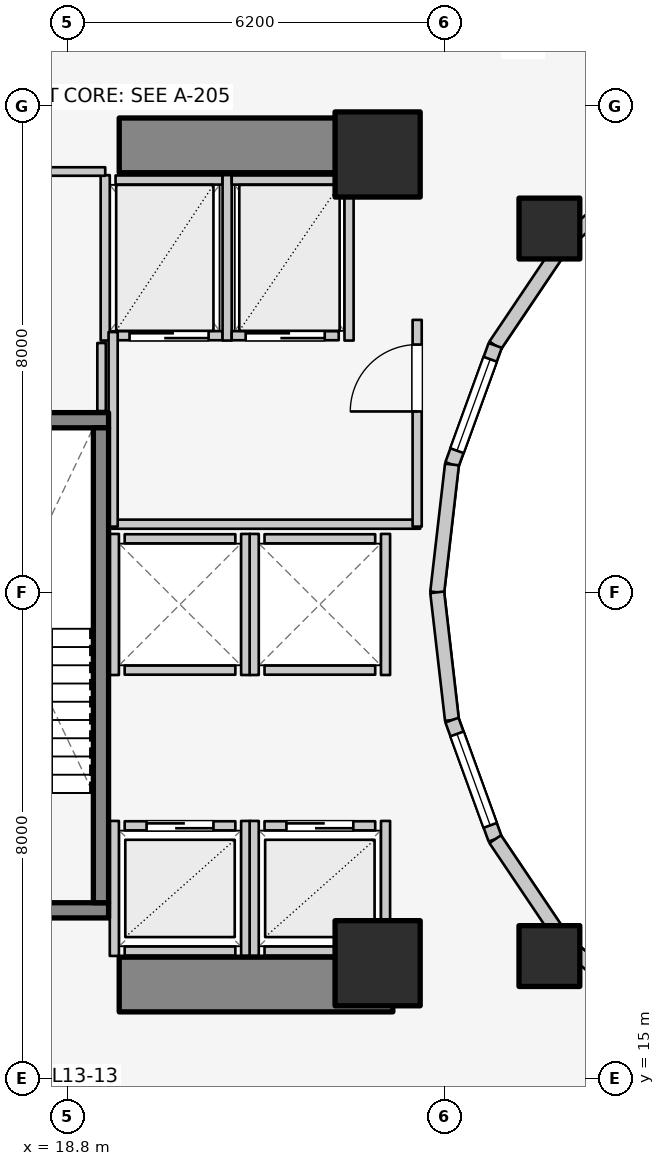
"""IFC4 building model, lengths in metres.
Left out: names, types, materials, properties, quantities, classifications, styles, units other than length and angle.
Written with IfcOpenShell. Run it as: python <this file> out.ifc"""

import sys

from ifc_helpers import new_model, si_unit, direction, frame, frame_2d, origin, origin_2d, place, context, subcontext, project, spatial, rectangle, extrude, element, fill, save


model = new_model("IFC4")
c1 = context("Model", 3, precision=1e-05, world=origin(), true_north=direction((0.0, 1.0)))
c2 = subcontext(c1, "Body", "Model", "MODEL_VIEW")
j1 = project(units=[si_unit("LENGTHUNIT", "METRE"), si_unit("PLANEANGLEUNIT", "RADIAN")], contexts=[c1])
p1 = place(None, origin())
s1 = spatial("IfcSite", under=j1, at=p1, CompositionType="ELEMENT")
p2 = place(p1, origin())
s2 = spatial("IfcBuilding", under=s1, at=p2, CompositionType="ELEMENT")
p3 = place(p2, frame((0.0, 0.0, 46.2)))
s3 = spatial("IfcBuildingStorey", under=s2, at=p3, CompositionType="ELEMENT", Elevation=46.2)
for number, where, z_axis, x_axis in (
    (1, (19.65, 16.55, 0.0), (0.0, 0.0, 1.0), (1.0, 0.0, 0.0)),
    (2, (19.65, 30.35, 0.0), (0.0, 0.0, 1.0), (1.0, 0.0, 0.0)),
):
    element("IfcWall", number, at=place(p3, frame(where, z_axis=z_axis, x_axis=x_axis)), inside=s3, PredefinedType="SHEAR", context=c2, shape_type="SweptSolid", body=[
        extrude(rectangle(XDim=4.5, YDim=0.9, at=frame_2d((2.25, 0.0))), origin(), (0.0, 0.0, 1.0), 3.1),
    ])
p4 = place(p3, frame((16.105, 17.77, 0.0), z_axis=(0.0, 0.0, 1.0), x_axis=(1.0, 0.0, 0.0)))
e3 = element("IfcWall", 3, at=p4, inside=s3, PredefinedType="SOLIDWALL", context=c2, shape_type="SweptSolid", body=[
    extrude(rectangle(XDim=3.37, YDim=0.25, at=frame_2d((1.685, 0.0))), origin(), (0.0, 0.0, 1.0), 3.1),
])
p5 = place(p4, frame((1.135, 0.0, 0.0)))
e4 = element("IfcOpeningElement", 4, at=p5, cuts=e3, PredefinedType="OPENING", context=c2, shape_type="SweptSolid", body=[
    extrude(rectangle(XDim=1.1, YDim=2.1, at=frame_2d((0.55, 1.05))), frame((0.0, 0.135, 0.0), z_axis=(0.0, -1.0, 0.0), x_axis=(1.0, 0.0, 0.0)), (0.0, 0.0, 1.0), 0.27),
])
p6 = place(p3, frame((16.105, 25.83, 0.0), z_axis=(0.0, 0.0, 1.0), x_axis=(1.0, 0.0, 0.0)))
e5 = element("IfcWall", 5, at=p6, inside=s3, PredefinedType="SOLIDWALL", context=c2, shape_type="SweptSolid", body=[
    extrude(rectangle(XDim=3.37, YDim=0.25, at=frame_2d((1.685, 0.0))), origin(), (0.0, 0.0, 1.0), 3.1),
])
p7 = place(p3, frame((19.35, 17.895, 0.0), z_axis=(0.0, 0.0, 1.0), x_axis=(0.0, 1.0, 0.0)))
e6 = element("IfcWall", 6, at=p7, inside=s3, PredefinedType="SOLIDWALL", context=c2, shape_type="SweptSolid", body=[
    extrude(rectangle(XDim=7.81, YDim=0.25, at=frame_2d((3.905, 0.0))), origin(), (0.0, 0.0, 1.0), 3.1),
])
for number, where, z_axis, x_axis in (
    (7, (23.9, 16.9, 0.0), (0.0, 0.0, 1.0), (1.0, 0.0, 0.0)),
    (8, (23.9, 30.2, 0.0), (0.0, 0.0, 1.0), (1.0, 0.0, 0.0)),
):
    element("IfcColumn", number, at=place(p3, frame(where, z_axis=z_axis, x_axis=x_axis)), inside=s3, PredefinedType="COLUMN", context=c2, shape_type="SweptSolid", body=[
        extrude(rectangle(XDim=1.4, YDim=1.4, at=origin_2d()), origin(), (0.0, 0.0, 1.0), 3.1),
    ])
for number, where, z_axis, x_axis in (
    (9, (26.725, 28.982, 0.0), (0.0, 0.0, 1.0), (1.0, 0.0, 0.0)),
    (10, (26.725, 17.018, 0.0), (0.0, 0.0, 1.0), (1.0, 0.0, 0.0)),
):
    element("IfcColumn", number, at=place(p3, frame(where, z_axis=z_axis, x_axis=x_axis)), inside=s3, PredefinedType="COLUMN", context=c2, shape_type="SweptSolid", body=[
        extrude(rectangle(XDim=1.0, YDim=1.0, at=origin_2d()), origin(), (0.0, 0.0, 1.0), 3.1),
    ])
p8 = place(p3, frame((28.44, 30.032, 0.0), z_axis=(0.0, 0.0, 1.0), x_axis=(-0.752576694707, -0.658504607869, 0.0)))
e11 = element("IfcWall", 11, at=p8, inside=s3, PredefinedType="STANDARD", context=c2, shape_type="SweptSolid", body=[
    extrude(rectangle(XDim=1.959, YDim=0.23, at=frame_2d((0.98, 0.0))), origin(), (0.0, 0.0, 1.0), 2.16),
])
p9 = place(p3, frame((26.965, 28.742, 0.0), z_axis=(0.0, 0.0, 1.0), x_axis=(-0.558197800898, -0.829707909492, 0.0)))
e12 = element("IfcWall", 12, at=p9, inside=s3, PredefinedType="STANDARD", context=c2, shape_type="SweptSolid", body=[
    extrude(rectangle(XDim=2.027, YDim=0.23, at=frame_2d((1.013, 0.0))), origin(), (0.0, 0.0, 1.0), 2.16),
])
p10 = place(p3, frame((25.834, 27.06, 0.0), z_axis=(0.0, 0.0, 1.0), x_axis=(-0.341423187295, -0.93990968033, 0.0)))
e13 = element("IfcWall", 13, at=p10, inside=s3, PredefinedType="STANDARD", context=c2, shape_type="SweptSolid", body=[
    extrude(rectangle(XDim=2.084, YDim=0.23, at=frame_2d((1.042, 0.0))), origin(), (0.0, 0.0, 1.0), 2.84),
])
p11 = place(p10, frame((0.242, 0.0, 0.85)))
e14 = element("IfcOpeningElement", 14, at=p11, cuts=e13, PredefinedType="OPENING", context=c2, shape_type="SweptSolid", body=[
    extrude(rectangle(XDim=1.6, YDim=1.65, at=frame_2d((0.8, 0.825))), frame((0.0, 0.125, 0.0), z_axis=(0.0, -1.0, 0.0), x_axis=(1.0, 0.0, 0.0)), (0.0, 0.0, 1.0), 0.25),
])
for number, where, z_axis, x_axis in (
    (15, (25.123, 25.102, 0.0), (0.0, 0.0, 1.0), (-0.115, -0.993, 0.0)),
    (16, (24.88, 23.0, 0.0), (0.0, 0.0, 1.0), (0.115, -0.993, 0.0)),
):
    element("IfcWall", number, at=place(p3, frame(where, z_axis=z_axis, x_axis=x_axis)), inside=s3, PredefinedType="STANDARD", context=c2, shape_type="SweptSolid", body=[
        extrude(rectangle(XDim=2.115, YDim=0.23, at=frame_2d((1.058, 0.0))), origin(), (0.0, 0.0, 1.0), 2.84),
    ])
p12 = place(p3, frame((25.123, 20.898, 0.0), z_axis=(0.0, 0.0, 1.0), x_axis=(0.341423187295, -0.93990968033, 0.0)))
e17 = element("IfcWall", 17, at=p12, inside=s3, PredefinedType="STANDARD", context=c2, shape_type="SweptSolid", body=[
    extrude(rectangle(XDim=2.084, YDim=0.23, at=frame_2d((1.042, 0.0))), origin(), (0.0, 0.0, 1.0), 2.84),
])
p13 = place(p12, frame((0.242, 0.0, 0.85)))
e18 = element("IfcOpeningElement", 18, at=p13, cuts=e17, PredefinedType="OPENING", context=c2, shape_type="SweptSolid", body=[
    extrude(rectangle(XDim=1.6, YDim=1.65, at=frame_2d((0.8, 0.825))), frame((0.0, 0.125, 0.0), z_axis=(0.0, -1.0, 0.0), x_axis=(1.0, 0.0, 0.0)), (0.0, 0.0, 1.0), 0.25),
])
p14 = place(p3, frame((25.834, 18.94, 0.0), z_axis=(0.0, 0.0, 1.0), x_axis=(0.558197800898, -0.829707909492, 0.0)))
e19 = element("IfcWall", 19, at=p14, inside=s3, PredefinedType="STANDARD", context=c2, shape_type="SweptSolid", body=[
    extrude(rectangle(XDim=2.027, YDim=0.23, at=frame_2d((1.013, 0.0))), origin(), (0.0, 0.0, 1.0), 2.16),
])
p15 = place(p3, frame((26.965, 17.258, 0.0), z_axis=(0.0, 0.0, 1.0), x_axis=(0.752576694707, -0.658504607869, 0.0)))
e20 = element("IfcWall", 20, at=p15, inside=s3, PredefinedType="STANDARD", context=c2, shape_type="SweptSolid", body=[
    extrude(rectangle(XDim=1.959, YDim=0.23, at=frame_2d((0.98, 0.0))), origin(), (0.0, 0.0, 1.0), 2.16),
])
p16 = place(p3, frame((19.74, 19.16, 0.0), z_axis=(0.0, 0.0, 1.0), x_axis=(1.0, 0.0, 0.0)))
e21 = element("IfcWall", 21, at=p16, inside=s3, PredefinedType="SOLIDWALL", context=c2, shape_type="SweptSolid", body=[
    extrude(rectangle(XDim=1.82, YDim=0.15, at=frame_2d((0.91, 0.0))), origin(), (0.0, 0.0, 1.0), 2.855),
])
p17 = place(p16, frame((0.36, 0.0, 0.0)))
e22 = element("IfcOpeningElement", 22, at=p17, cuts=e21, PredefinedType="OPENING", context=c2, shape_type="SweptSolid", body=[
    extrude(rectangle(XDim=1.1, YDim=2.1, at=frame_2d((0.55, 1.05))), frame((0.0, 0.085, 0.0), z_axis=(0.0, -1.0, 0.0), x_axis=(1.0, 0.0, 0.0)), (0.0, 0.0, 1.0), 0.17),
])
p18 = place(p3, frame((19.74, 17.1, 0.0), z_axis=(0.0, 0.0, 1.0), x_axis=(1.0, 0.0, 0.0)))
e23 = element("IfcWall", 23, at=p18, inside=s3, PredefinedType="SOLIDWALL", context=c2, shape_type="SweptSolid", body=[
    extrude(rectangle(XDim=1.82, YDim=0.15, at=frame_2d((0.91, 0.0))), origin(), (0.0, 0.0, 1.0), 2.855),
])
p19 = place(p3, frame((19.57, 17.02, 0.0), z_axis=(0.0, 0.0, 1.0), x_axis=(0.0, 1.0, 0.0)))
e24 = element("IfcWall", 24, at=p19, inside=s3, PredefinedType="SOLIDWALL", context=c2, shape_type="SweptSolid", body=[
    extrude(rectangle(XDim=2.22, YDim=0.15, at=frame_2d((1.11, 0.0))), origin(), (0.0, 0.0, 1.0), 2.12),
])
p20 = place(p3, frame((21.73, 17.02, 0.0), z_axis=(0.0, 0.0, 1.0), x_axis=(0.0, 1.0, 0.0)))
e25 = element("IfcWall", 25, at=p20, inside=s3, PredefinedType="SOLIDWALL", context=c2, shape_type="SweptSolid", body=[
    extrude(rectangle(XDim=2.22, YDim=0.15, at=frame_2d((1.11, 0.0))), origin(), (0.0, 0.0, 1.0), 2.855),
])
p21 = place(p3, frame((22.04, 19.16, 0.0), z_axis=(0.0, 0.0, 1.0), x_axis=(1.0, 0.0, 0.0)))
e26 = element("IfcWall", 26, at=p21, inside=s3, PredefinedType="SOLIDWALL", context=c2, shape_type="SweptSolid", body=[
    extrude(rectangle(XDim=1.82, YDim=0.15, at=frame_2d((0.91, 0.0))), origin(), (0.0, 0.0, 1.0), 2.12),
])
p22 = place(p21, frame((0.36, 0.0, 0.0)))
e27 = element("IfcOpeningElement", 27, at=p22, cuts=e26, PredefinedType="OPENING", context=c2, shape_type="SweptSolid", body=[
    extrude(rectangle(XDim=1.1, YDim=2.1, at=frame_2d((0.55, 1.05))), frame((0.0, 0.085, 0.0), z_axis=(0.0, -1.0, 0.0), x_axis=(1.0, 0.0, 0.0)), (0.0, 0.0, 1.0), 0.17),
])
p23 = place(p3, frame((22.04, 17.1, 0.0), z_axis=(0.0, 0.0, 1.0), x_axis=(1.0, 0.0, 0.0)))
e28 = element("IfcWall", 28, at=p23, inside=s3, PredefinedType="SOLIDWALL", context=c2, shape_type="SweptSolid", body=[
    extrude(rectangle(XDim=1.82, YDim=0.15, at=frame_2d((0.91, 0.0))), origin(), (0.0, 0.0, 1.0), 2.12),
])
p24 = place(p3, frame((21.87, 17.02, 0.0), z_axis=(0.0, 0.0, 1.0), x_axis=(0.0, 1.0, 0.0)))
e29 = element("IfcWall", 29, at=p24, inside=s3, PredefinedType="SOLIDWALL", context=c2, shape_type="SweptSolid", body=[
    extrude(rectangle(XDim=2.22, YDim=0.15, at=frame_2d((1.11, 0.0))), origin(), (0.0, 0.0, 1.0), 2.855),
])
p25 = place(p3, frame((24.03, 17.02, 0.0), z_axis=(0.0, 0.0, 1.0), x_axis=(0.0, 1.0, 0.0)))
e30 = element("IfcWall", 30, at=p25, inside=s3, PredefinedType="SOLIDWALL", context=c2, shape_type="SweptSolid", body=[
    extrude(rectangle(XDim=2.22, YDim=0.15, at=frame_2d((1.11, 0.0))), origin(), (0.0, 0.0, 1.0), 2.12),
])
for number, where, z_axis, x_axis in (
    (31, (19.74, 21.72, 0.0), (0.0, 0.0, 1.0), (1.0, 0.0, 0.0)),
    (32, (19.74, 23.88, 0.0), (0.0, 0.0, 1.0), (1.0, 0.0, 0.0)),
):
    element("IfcWall", number, at=place(p3, frame(where, z_axis=z_axis, x_axis=x_axis)), inside=s3, PredefinedType="SOLIDWALL", context=c2, shape_type="SweptSolid", body=[
        extrude(rectangle(XDim=1.82, YDim=0.15, at=frame_2d((0.91, 0.0))), origin(), (0.0, 0.0, 1.0), 2.855),
    ])
for number, where, z_axis, x_axis in (
    (33, (19.57, 21.64, 0.0), (0.0, 0.0, 1.0), (0.0, 1.0, 0.0)),
    (34, (21.73, 21.64, 0.0), (0.0, 0.0, 1.0), (0.0, 1.0, 0.0)),
):
    element("IfcWall", number, at=place(p3, frame(where, z_axis=z_axis, x_axis=x_axis)), inside=s3, PredefinedType="SOLIDWALL", context=c2, shape_type="SweptSolid", body=[
        extrude(rectangle(XDim=2.32, YDim=0.15, at=frame_2d((1.16, 0.0))), origin(), (0.0, 0.0, 1.0), 2.855),
    ])
for number, where, z_axis, x_axis in (
    (35, (22.04, 21.72, 0.0), (0.0, 0.0, 1.0), (1.0, 0.0, 0.0)),
    (36, (22.04, 23.88, 0.0), (0.0, 0.0, 1.0), (1.0, 0.0, 0.0)),
):
    element("IfcWall", number, at=place(p3, frame(where, z_axis=z_axis, x_axis=x_axis)), inside=s3, PredefinedType="SOLIDWALL", context=c2, shape_type="SweptSolid", body=[
        extrude(rectangle(XDim=1.82, YDim=0.15, at=frame_2d((0.91, 0.0))), origin(), (0.0, 0.0, 1.0), 2.12),
    ])
p26 = place(p3, frame((21.87, 21.64, 0.0), z_axis=(0.0, 0.0, 1.0), x_axis=(0.0, 1.0, 0.0)))
e37 = element("IfcWall", 37, at=p26, inside=s3, PredefinedType="SOLIDWALL", context=c2, shape_type="SweptSolid", body=[
    extrude(rectangle(XDim=2.32, YDim=0.15, at=frame_2d((1.16, 0.0))), origin(), (0.0, 0.0, 1.0), 2.855),
])
p27 = place(p3, frame((24.03, 21.64, 0.0), z_axis=(0.0, 0.0, 1.0), x_axis=(0.0, 1.0, 0.0)))
e38 = element("IfcWall", 38, at=p27, inside=s3, PredefinedType="SOLIDWALL", context=c2, shape_type="SweptSolid", body=[
    extrude(rectangle(XDim=2.32, YDim=0.15, at=frame_2d((1.16, 0.0))), origin(), (0.0, 0.0, 1.0), 2.12),
])
p28 = place(p3, frame((19.59, 27.22, 0.0), z_axis=(0.0, 0.0, 1.0), x_axis=(1.0, 0.0, 0.0)))
e39 = element("IfcWall", 39, at=p28, inside=s3, PredefinedType="SOLIDWALL", context=c2, shape_type="SweptSolid", body=[
    extrude(rectangle(XDim=1.76, YDim=0.15, at=frame_2d((0.88, 0.0))), origin(), (0.0, 0.0, 1.0), 2.855),
])
p29 = place(p28, frame((0.23, 0.0, 0.0)))
e40 = element("IfcOpeningElement", 40, at=p29, cuts=e39, PredefinedType="OPENING", context=c2, shape_type="SweptSolid", body=[
    extrude(rectangle(XDim=1.3, YDim=2.1, at=frame_2d((0.65, 1.05))), frame((0.0, 0.085, 0.0), z_axis=(0.0, -1.0, 0.0), x_axis=(1.0, 0.0, 0.0)), (0.0, 0.0, 1.0), 0.17),
])
p30 = place(p3, frame((19.59, 29.78, 0.0), z_axis=(0.0, 0.0, 1.0), x_axis=(1.0, 0.0, 0.0)))
e41 = element("IfcWall", 41, at=p30, inside=s3, PredefinedType="SOLIDWALL", context=c2, shape_type="SweptSolid", body=[
    extrude(rectangle(XDim=1.76, YDim=0.15, at=frame_2d((0.88, 0.0))), origin(), (0.0, 0.0, 1.0), 2.855),
])
for number, where, z_axis, x_axis in (
    (42, (19.42, 27.14, 0.0), (0.0, 0.0, 1.0), (0.0, 1.0, 0.0)),
    (43, (21.425, 27.14, 0.0), (0.0, 0.0, 1.0), (0.0, 1.0, 0.0)),
):
    element("IfcWall", number, at=place(p3, frame(where, z_axis=z_axis, x_axis=x_axis)), inside=s3, PredefinedType="SOLIDWALL", context=c2, shape_type="SweptSolid", body=[
        extrude(rectangle(XDim=2.72, YDim=0.15, at=frame_2d((1.36, 0.0))), origin(), (0.0, 0.0, 1.0), 2.855),
    ])
p31 = place(p3, frame((21.5, 27.22, 0.0), z_axis=(0.0, 0.0, 1.0), x_axis=(1.0, 0.0, 0.0)))
e44 = element("IfcWall", 44, at=p31, inside=s3, PredefinedType="SOLIDWALL", context=c2, shape_type="SweptSolid", body=[
    extrude(rectangle(XDim=1.76, YDim=0.15, at=frame_2d((0.88, 0.0))), origin(), (0.0, 0.0, 1.0), 2.855),
])
p32 = place(p31, frame((0.23, 0.0, 0.0)))
e45 = element("IfcOpeningElement", 45, at=p32, cuts=e44, PredefinedType="OPENING", context=c2, shape_type="SweptSolid", body=[
    extrude(rectangle(XDim=1.3, YDim=2.1, at=frame_2d((0.65, 1.05))), frame((0.0, 0.085, 0.0), z_axis=(0.0, -1.0, 0.0), x_axis=(1.0, 0.0, 0.0)), (0.0, 0.0, 1.0), 0.17),
])
p33 = place(p3, frame((21.5, 29.78, 0.0), z_axis=(0.0, 0.0, 1.0), x_axis=(1.0, 0.0, 0.0)))
e46 = element("IfcWall", 46, at=p33, inside=s3, PredefinedType="SOLIDWALL", context=c2, shape_type="SweptSolid", body=[
    extrude(rectangle(XDim=1.76, YDim=0.15, at=frame_2d((0.88, 0.0))), origin(), (0.0, 0.0, 1.0), 2.855),
])
p34 = place(p3, frame((23.43, 27.14, 0.0), z_axis=(0.0, 0.0, 1.0), x_axis=(0.0, 1.0, 0.0)))
e47 = element("IfcWall", 47, at=p34, inside=s3, PredefinedType="SOLIDWALL", context=c2, shape_type="SweptSolid", body=[
    extrude(rectangle(XDim=2.72, YDim=0.15, at=frame_2d((1.36, 0.0))), origin(), (0.0, 0.0, 1.0), 2.855),
])
p35 = place(p3, frame((19.52, 24.12, 0.0), z_axis=(0.0, 0.0, 1.0), x_axis=(1.0, 0.0, 0.0)))
e48 = element("IfcWall", 48, at=p35, inside=s3, PredefinedType="PARTITIONING", context=c2, shape_type="SweptSolid", body=[
    extrude(rectangle(XDim=5.08, YDim=0.15, at=frame_2d((2.54, 0.0))), origin(), (0.0, 0.0, 1.0), 2.12),
])
p36 = place(p3, frame((19.55, 24.08, 0.0), z_axis=(0.0, 0.0, 1.0), x_axis=(0.0, 1.0, 0.0)))
e49 = element("IfcWall", 49, at=p36, inside=s3, PredefinedType="PARTITIONING", context=c2, shape_type="SweptSolid", body=[
    extrude(rectangle(XDim=3.2, YDim=0.15, at=frame_2d((1.6, 0.0))), origin(), (0.0, 0.0, 1.0), 2.855),
])
p37 = place(p3, frame((24.55, 24.08, 0.0), z_axis=(0.0, 0.0, 1.0), x_axis=(0.0, 1.0, 0.0)))
e50 = element("IfcWall", 50, at=p37, inside=s3, PredefinedType="PARTITIONING", context=c2, shape_type="SweptSolid", body=[
    extrude(rectangle(XDim=3.4, YDim=0.15, at=frame_2d((1.7, 0.0))), origin(), (0.0, 0.0, 1.0), 2.855),
])
p38 = place(p37, frame((1.894, 0.0, 0.0)))
e51 = element("IfcOpeningElement", 51, at=p38, cuts=e50, PredefinedType="OPENING", context=c2, shape_type="SweptSolid", body=[
    extrude(rectangle(XDim=1.1, YDim=2.1, at=frame_2d((0.55, 1.05))), frame((0.0, 0.085, 0.0), z_axis=(0.0, -1.0, 0.0), x_axis=(1.0, 0.0, 0.0)), (0.0, 0.0, 1.0), 0.17),
])
p39 = place(p3, frame((16.12, 29.92, 0.0), z_axis=(0.0, 0.0, 1.0), x_axis=(1.0, 0.0, 0.0)))
e52 = element("IfcWall", 52, at=p39, inside=s3, PredefinedType="PLUMBINGWALL", context=c2, shape_type="SweptSolid", body=[
    extrude(rectangle(XDim=3.3, YDim=0.14, at=frame_2d((1.65, 0.0))), origin(), (0.0, 0.0, 1.0), 2.855),
])
p40 = place(p39, frame((1.516, 0.0, 0.0)))
e53 = element("IfcOpeningElement", 53, at=p40, cuts=e52, PredefinedType="OPENING", context=c2, shape_type="SweptSolid", body=[
    extrude(rectangle(XDim=0.85, YDim=2.05, at=frame_2d((0.425, 1.025))), frame((0.0, 0.08, 0.0), z_axis=(0.0, -1.0, 0.0), x_axis=(1.0, 0.0, 0.0)), (0.0, 0.0, 1.0), 0.16),
])
p41 = place(p3, frame((19.36, 25.98, 0.0), z_axis=(0.0, 0.0, 1.0), x_axis=(0.0, 1.0, 0.0)))
e54 = element("IfcWall", 54, at=p41, inside=s3, PredefinedType="PLUMBINGWALL", context=c2, shape_type="SweptSolid", body=[
    extrude(rectangle(XDim=1.12, YDim=0.14, at=frame_2d((0.56, 0.0))), origin(), (0.0, 0.0, 1.0), 2.855),
])
p42 = place(p11, origin())
e55 = element("IfcWindow", 55, at=p42, inside=s3, PartitioningType="SINGLE_PANEL", PredefinedType="WINDOW", context=c2, shape_type="SweptSolid", body=[
    extrude(rectangle(XDim=1.6, YDim=1.65, at=frame_2d((0.8, 0.825))), frame((0.0, 0.03, 0.0), z_axis=(0.0, -1.0, 0.0), x_axis=(1.0, 0.0, 0.0)), (0.0, 0.0, 1.0), 0.06),
])
fill(e14, e55)
p43 = place(p13, origin())
e56 = element("IfcWindow", 56, at=p43, inside=s3, PartitioningType="SINGLE_PANEL", PredefinedType="WINDOW", context=c2, shape_type="SweptSolid", body=[
    extrude(rectangle(XDim=1.6, YDim=1.65, at=frame_2d((0.8, 0.825))), frame((0.0, 0.03, 0.0), z_axis=(0.0, -1.0, 0.0), x_axis=(1.0, 0.0, 0.0)), (0.0, 0.0, 1.0), 0.06),
])
fill(e18, e56)
p44 = place(p17, origin())
e57 = element("IfcDoor", 57, at=p44, inside=s3, OperationType="DOUBLE_DOOR_SLIDING", PredefinedType="DOOR", context=c2, shape_type="SweptSolid", body=[
    extrude(rectangle(XDim=1.1, YDim=2.1, at=frame_2d((0.55, 1.05))), frame((0.0, 0.025, 0.0), z_axis=(0.0, -1.0, 0.0), x_axis=(1.0, 0.0, 0.0)), (0.0, 0.0, 1.0), 0.05),
])
fill(e22, e57)
p45 = place(p22, origin())
e58 = element("IfcDoor", 58, at=p45, inside=s3, OperationType="DOUBLE_DOOR_SLIDING", PredefinedType="DOOR", context=c2, shape_type="SweptSolid", body=[
    extrude(rectangle(XDim=1.1, YDim=2.1, at=frame_2d((0.55, 1.05))), frame((0.0, 0.025, 0.0), z_axis=(0.0, -1.0, 0.0), x_axis=(1.0, 0.0, 0.0)), (0.0, 0.0, 1.0), 0.05),
])
fill(e27, e58)
p46 = place(p29, origin())
e59 = element("IfcDoor", 59, at=p46, inside=s3, OperationType="DOUBLE_DOOR_SLIDING", PredefinedType="DOOR", context=c2, shape_type="SweptSolid", body=[
    extrude(rectangle(XDim=1.3, YDim=2.1, at=frame_2d((0.65, 1.05))), frame((0.0, 0.025, 0.0), z_axis=(0.0, -1.0, 0.0), x_axis=(1.0, 0.0, 0.0)), (0.0, 0.0, 1.0), 0.05),
])
fill(e40, e59)
p47 = place(p32, origin())
e60 = element("IfcDoor", 60, at=p47, inside=s3, OperationType="DOUBLE_DOOR_SLIDING", PredefinedType="DOOR", context=c2, shape_type="SweptSolid", body=[
    extrude(rectangle(XDim=1.3, YDim=2.1, at=frame_2d((0.65, 1.05))), frame((0.0, 0.025, 0.0), z_axis=(0.0, -1.0, 0.0), x_axis=(1.0, 0.0, 0.0)), (0.0, 0.0, 1.0), 0.05),
])
fill(e45, e60)
p48 = place(p38, origin())
e61 = element("IfcDoor", 61, at=p48, inside=s3, OperationType="SINGLE_SWING_LEFT", PredefinedType="DOOR", context=c2, shape_type="SweptSolid", body=[
    extrude(rectangle(XDim=1.1, YDim=2.1, at=frame_2d((0.55, 1.05))), frame((0.0, 0.025, 0.0), z_axis=(0.0, -1.0, 0.0), x_axis=(1.0, 0.0, 0.0)), (0.0, 0.0, 1.0), 0.05),
])
fill(e51, e61)
save(model, sys.argv[1])
